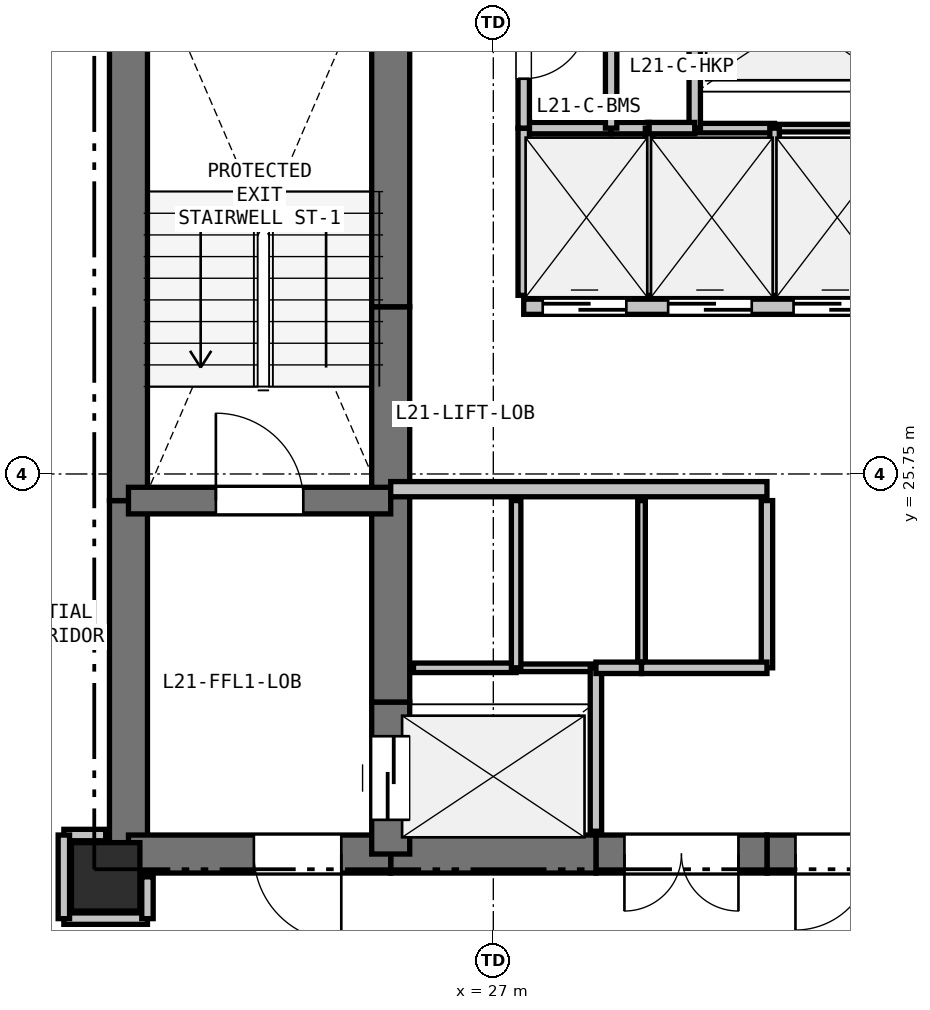
"""IFC4 building model, lengths in metres.
Left out: names, types, materials, properties, quantities, classifications, styles, units other than length and angle.
Written with IfcOpenShell. Run it as: python <this file> out.ifc"""

import sys

from ifc_helpers import new_model, si_unit, direction, frame, frame_2d, origin, origin_2d, place, context, subcontext, project, spatial, rectangle, extrude, element, fill, save


model = new_model("IFC4")
c1 = context("Model", 3, precision=1e-05, world=origin(), true_north=direction((0.0, 1.0)))
c2 = subcontext(c1, "Body", "Model", "MODEL_VIEW")
j1 = project(units=[si_unit("LENGTHUNIT", "METRE"), si_unit("PLANEANGLEUNIT", "RADIAN")], contexts=[c1])
p1 = place(None, origin())
s1 = spatial("IfcSite", under=j1, at=p1, CompositionType="ELEMENT")
p2 = place(p1, origin())
s2 = spatial("IfcBuilding", under=s1, at=p2, CompositionType="ELEMENT")
p3 = place(p2, frame((0.0, 0.0, 80.1)))
s3 = spatial("IfcBuildingStorey", under=s2, at=p3, CompositionType="ELEMENT", Elevation=80.1)
p4 = place(p3, frame((21.9, 20.45, 0.0), z_axis=(0.0, 0.0, 1.0), x_axis=(1.0, 0.0, 0.0)))
e1 = element("IfcColumn", 1, at=p4, inside=s3, PredefinedType="COLUMN", context=c2, shape_type="SweptSolid", body=[
    extrude(rectangle(XDim=0.9, YDim=0.9, at=origin_2d()), origin(), (0.0, 0.0, 1.0), 3.3),
])
p5 = place(p3, frame((22.2, 20.75, 0.0), z_axis=(0.0, 0.0, 1.0), x_axis=(0.0, 1.0, 0.0)))
e2 = element("IfcWall", 2, at=p5, inside=s3, PredefinedType="SHEAR", context=c2, shape_type="SweptSolid", body=[
    extrude(rectangle(XDim=4.65, YDim=0.5, at=frame_2d((2.325, 0.0))), origin(), (0.0, 0.0, 1.0), 3.05),
])
p6 = place(p3, frame((22.2, 25.4, 0.0), z_axis=(0.0, 0.0, 1.0), x_axis=(0.0, 1.0, 0.0)))
e3 = element("IfcWall", 3, at=p6, inside=s3, PredefinedType="SHEAR", context=c2, shape_type="SweptSolid", body=[
    extrude(rectangle(XDim=7.35, YDim=0.5, at=frame_2d((3.675, 0.0))), origin(), (0.0, 0.0, 1.0), 3.05),
])
p7 = place(p3, frame((32.35, 20.75, 0.0), z_axis=(0.0, 0.0, 1.0), x_axis=(-1.0, 0.0, 0.0)))
e4 = element("IfcWall", 4, at=p7, inside=s3, PredefinedType="SHEAR", context=c2, shape_type="SweptSolid", body=[
    extrude(rectangle(XDim=1.75, YDim=0.5, at=frame_2d((0.875, 0.0))), origin(), (0.0, 0.0, 1.0), 3.05),
])
p8 = place(p7, frame((0.375, 0.0, 0.0)))
e5 = element("IfcOpeningElement", 5, at=p8, cuts=e4, PredefinedType="OPENING", context=c2, shape_type="SweptSolid", body=[
    extrude(rectangle(XDim=1.0, YDim=2.15, at=frame_2d((0.5, 1.075))), frame((0.0, 0.26, 0.0), z_axis=(0.0, -1.0, 0.0), x_axis=(1.0, 0.0, 0.0)), (0.0, 0.0, 1.0), 0.52),
])
p9 = place(p3, frame((30.6, 20.75, 0.0), z_axis=(0.0, 0.0, 1.0), x_axis=(-1.0, 0.0, 0.0)))
e6 = element("IfcWall", 6, at=p9, inside=s3, PredefinedType="SHEAR", context=c2, shape_type="SweptSolid", body=[
    extrude(rectangle(XDim=2.25, YDim=0.5, at=frame_2d((1.125, 0.0))), origin(), (0.0, 0.0, 1.0), 3.05),
])
p10 = place(p9, frame((0.375, 0.0, 0.0)))
e7 = element("IfcOpeningElement", 7, at=p10, cuts=e6, PredefinedType="OPENING", context=c2, shape_type="SweptSolid", body=[
    extrude(rectangle(XDim=1.5, YDim=2.2, at=frame_2d((0.75, 1.1))), frame((0.0, 0.26, 0.0), z_axis=(0.0, -1.0, 0.0), x_axis=(1.0, 0.0, 0.0)), (0.0, 0.0, 1.0), 0.52),
])
p11 = place(p3, frame((28.35, 20.75, 0.0), z_axis=(0.0, 0.0, 1.0), x_axis=(-1.0, 0.0, 0.0)))
e8 = element("IfcWall", 8, at=p11, inside=s3, PredefinedType="SHEAR", context=c2, shape_type="SweptSolid", body=[
    extrude(rectangle(XDim=2.7, YDim=0.5, at=frame_2d((1.35, 0.0))), origin(), (0.0, 0.0, 1.0), 3.05),
])
p12 = place(p3, frame((25.65, 20.75, 0.0), z_axis=(0.0, 0.0, 1.0), x_axis=(-1.0, 0.0, 0.0)))
e9 = element("IfcWall", 9, at=p12, inside=s3, PredefinedType="SHEAR", context=c2, shape_type="SweptSolid", body=[
    extrude(rectangle(XDim=3.45, YDim=0.5, at=frame_2d((1.725, 0.0))), origin(), (0.0, 0.0, 1.0), 3.05),
])
p13 = place(p12, frame((0.65, 0.0, 0.0)))
e10 = element("IfcOpeningElement", 10, at=p13, cuts=e9, PredefinedType="OPENING", context=c2, shape_type="SweptSolid", body=[
    extrude(rectangle(XDim=1.15, YDim=2.15, at=frame_2d((0.575, 1.075))), frame((0.0, 0.26, 0.0), z_axis=(0.0, -1.0, 0.0), x_axis=(1.0, 0.0, 0.0)), (0.0, 0.0, 1.0), 0.52),
])
p14 = place(p3, frame((25.65, 20.75, 0.0), z_axis=(0.0, 0.0, 1.0), x_axis=(0.0, 1.0, 0.0)))
e11 = element("IfcWall", 11, at=p14, inside=s3, PredefinedType="SHEAR", context=c2, shape_type="SweptSolid", body=[
    extrude(rectangle(XDim=2.0, YDim=0.5, at=frame_2d((1.0, 0.0))), origin(), (0.0, 0.0, 1.0), 3.05),
])
p15 = place(p14, frame((0.45, 0.0, 0.0)))
e12 = element("IfcOpeningElement", 12, at=p15, cuts=e11, PredefinedType="OPENING", context=c2, shape_type="SweptSolid", body=[
    extrude(rectangle(XDim=1.1, YDim=2.15, at=frame_2d((0.55, 1.075))), frame((0.0, 0.26, 0.0), z_axis=(0.0, -1.0, 0.0), x_axis=(1.0, 0.0, 0.0)), (0.0, 0.0, 1.0), 0.52),
])
p16 = place(p3, frame((25.65, 22.75, 0.0), z_axis=(0.0, 0.0, 1.0), x_axis=(0.0, 1.0, 0.0)))
e13 = element("IfcWall", 13, at=p16, inside=s3, PredefinedType="SHEAR", context=c2, shape_type="SweptSolid", body=[
    extrude(rectangle(XDim=2.8, YDim=0.5, at=frame_2d((1.4, 0.0))), origin(), (0.0, 0.0, 1.0), 3.05),
])
p17 = place(p3, frame((25.65, 25.55, 0.0), z_axis=(0.0, 0.0, 1.0), x_axis=(0.0, 1.0, 0.0)))
e14 = element("IfcWall", 14, at=p17, inside=s3, PredefinedType="SHEAR", context=c2, shape_type="SweptSolid", body=[
    extrude(rectangle(XDim=2.4, YDim=0.5, at=frame_2d((1.2, 0.0))), origin(), (0.0, 0.0, 1.0), 3.05),
])
p18 = place(p3, frame((25.65, 27.95, 0.0), z_axis=(0.0, 0.0, 1.0), x_axis=(0.0, 1.0, 0.0)))
e15 = element("IfcWall", 15, at=p18, inside=s3, PredefinedType="SHEAR", context=c2, shape_type="SweptSolid", body=[
    extrude(rectangle(XDim=4.8, YDim=0.5, at=frame_2d((2.4, 0.0))), origin(), (0.0, 0.0, 1.0), 3.05),
])
p19 = place(p3, frame((22.2, 25.4, 0.0), z_axis=(0.0, 0.0, 1.0), x_axis=(1.0, 0.0, 0.0)))
e16 = element("IfcWall", 16, at=p19, inside=s3, PredefinedType="SHEAR", context=c2, shape_type="SweptSolid", body=[
    extrude(rectangle(XDim=3.45, YDim=0.35, at=frame_2d((1.725, 0.0))), origin(), (0.0, 0.0, 1.0), 3.05),
])
p20 = place(p19, frame((1.15, 0.0, 0.0)))
e17 = element("IfcOpeningElement", 17, at=p20, cuts=e16, PredefinedType="OPENING", context=c2, shape_type="SweptSolid", body=[
    extrude(rectangle(XDim=1.15, YDim=2.15, at=frame_2d((0.575, 1.075))), frame((0.0, 0.185, 0.0), z_axis=(0.0, -1.0, 0.0), x_axis=(1.0, 0.0, 0.0)), (0.0, 0.0, 1.0), 0.37),
])
p21 = place(p3, frame((25.65, 25.55, 0.0), z_axis=(0.0, 0.0, 1.0), x_axis=(1.0, 0.0, 0.0)))
e18 = element("IfcWall", 18, at=p21, inside=s3, PredefinedType="PARTITIONING", context=c2, shape_type="SweptSolid", body=[
    extrude(rectangle(XDim=4.95, YDim=0.2, at=frame_2d((2.475, 0.0))), origin(), (0.0, 0.0, 1.0), 3.05),
])
p22 = place(p3, frame((27.4, 27.95, 0.0), z_axis=(0.0, 0.0, 1.0), x_axis=(1.0, 0.0, 0.0)))
e19 = element("IfcWall", 19, at=p22, inside=s3, PredefinedType="PARTITIONING", context=c2, shape_type="SweptSolid", body=[
    extrude(rectangle(XDim=4.95, YDim=0.2, at=frame_2d((2.475, 0.0))), origin(), (0.0, 0.0, 1.0), 3.05),
])
p23 = place(p22, frame((0.25, 0.0, 0.0)))
e20 = element("IfcOpeningElement", 20, at=p23, cuts=e19, PredefinedType="OPENING", context=c2, shape_type="SweptSolid", body=[
    extrude(rectangle(XDim=1.1, YDim=2.15, at=frame_2d((0.55, 1.075))), frame((0.0, 0.11, 0.0), z_axis=(0.0, -1.0, 0.0), x_axis=(1.0, 0.0, 0.0)), (0.0, 0.0, 1.0), 0.22),
])
p24 = place(p22, frame((1.9, 0.0, 0.0)))
e21 = element("IfcOpeningElement", 21, at=p24, cuts=e19, PredefinedType="OPENING", context=c2, shape_type="SweptSolid", body=[
    extrude(rectangle(XDim=1.1, YDim=2.15, at=frame_2d((0.55, 1.075))), frame((0.0, 0.11, 0.0), z_axis=(0.0, -1.0, 0.0), x_axis=(1.0, 0.0, 0.0)), (0.0, 0.0, 1.0), 0.22),
])
p25 = place(p22, frame((3.55, 0.0, 0.0)))
e22 = element("IfcOpeningElement", 22, at=p25, cuts=e19, PredefinedType="OPENING", context=c2, shape_type="SweptSolid", body=[
    extrude(rectangle(XDim=1.1, YDim=2.15, at=frame_2d((0.55, 1.075))), frame((0.0, 0.11, 0.0), z_axis=(0.0, -1.0, 0.0), x_axis=(1.0, 0.0, 0.0)), (0.0, 0.0, 1.0), 0.22),
])
p26 = place(p3, frame((25.95, 23.2, 0.0), z_axis=(0.0, 0.0, 1.0), x_axis=(1.0, 0.0, 0.0)))
e23 = element("IfcWall", 23, at=p26, inside=s3, PredefinedType="PARTITIONING", context=c2, shape_type="SweptSolid", body=[
    extrude(rectangle(XDim=1.35, YDim=0.125, at=frame_2d((0.675, 0.0))), origin(), (0.0, 0.0, 1.0), 3.05),
])
p27 = place(p3, frame((27.3, 23.2, 0.0), z_axis=(0.0, 0.0, 1.0), x_axis=(1.0, 0.0, 0.0)))
e24 = element("IfcWall", 24, at=p27, inside=s3, PredefinedType="PARTITIONING", context=c2, shape_type="SweptSolid", body=[
    extrude(rectangle(XDim=1.05, YDim=0.1, at=frame_2d((0.525, 0.0))), origin(), (0.0, 0.0, 1.0), 3.05),
])
p28 = place(p3, frame((28.35, 23.2, 0.0), z_axis=(0.0, 0.0, 1.0), x_axis=(0.0, -1.0, 0.0)))
e25 = element("IfcWall", 25, at=p28, inside=s3, PredefinedType="PARTITIONING", context=c2, shape_type="SweptSolid", body=[
    extrude(rectangle(XDim=2.15, YDim=0.15, at=frame_2d((1.075, 0.0))), origin(), (0.0, 0.0, 1.0), 3.05),
])
p29 = place(p3, frame((32.05, 30.3, 0.0), z_axis=(0.0, 0.0, 1.0), x_axis=(-1.0, 0.0, 0.0)))
e26 = element("IfcWall", 26, at=p29, inside=s3, PredefinedType="PARTITIONING", context=c2, shape_type="SweptSolid", body=[
    extrude(rectangle(XDim=1.35, YDim=0.1, at=frame_2d((0.675, 0.0))), origin(), (0.0, 0.0, 1.0), 3.05),
])
p30 = place(p3, frame((30.7, 30.3, 0.0), z_axis=(0.0, 0.0, 1.0), x_axis=(-1.0, 0.0, 0.0)))
e27 = element("IfcWall", 27, at=p30, inside=s3, PredefinedType="PARTITIONING", context=c2, shape_type="SweptSolid", body=[
    extrude(rectangle(XDim=1.05, YDim=0.125, at=frame_2d((0.525, 0.0))), origin(), (0.0, 0.0, 1.0), 3.05),
])
p31 = place(p3, frame((29.65, 30.3, 0.0), z_axis=(0.0, 0.0, 1.0), x_axis=(0.0, 1.0, 0.0)))
e28 = element("IfcWall", 28, at=p31, inside=s3, PredefinedType="PARTITIONING", context=c2, shape_type="SweptSolid", body=[
    extrude(rectangle(XDim=2.15, YDim=0.15, at=frame_2d((1.075, 0.0))), origin(), (0.0, 0.0, 1.0), 3.05),
])
p32 = place(p3, frame((27.3, 25.4, 0.0), z_axis=(0.0, 0.0, 1.0), x_axis=(0.0, -1.0, 0.0)))
e29 = element("IfcWall", 29, at=p32, inside=s3, PredefinedType="PARTITIONING", context=c2, shape_type="SweptSolid", body=[
    extrude(rectangle(XDim=2.2, YDim=0.125, at=frame_2d((1.1, 0.0))), origin(), (0.0, 0.0, 1.0), 3.05),
])
p33 = place(p3, frame((28.95, 25.4, 0.0), z_axis=(0.0, 0.0, 1.0), x_axis=(0.0, -1.0, 0.0)))
e30 = element("IfcWall", 30, at=p33, inside=s3, PredefinedType="PARTITIONING", context=c2, shape_type="SweptSolid", body=[
    extrude(rectangle(XDim=2.2, YDim=0.1, at=frame_2d((1.1, 0.0))), origin(), (0.0, 0.0, 1.0), 3.05),
])
p34 = place(p3, frame((28.95, 23.2, 0.0), z_axis=(0.0, 0.0, 1.0), x_axis=(-1.0, 0.0, 0.0)))
e31 = element("IfcWall", 31, at=p34, inside=s3, PredefinedType="PARTITIONING", context=c2, shape_type="SweptSolid", body=[
    extrude(rectangle(XDim=0.6, YDim=0.15, at=frame_2d((0.3, 0.0))), origin(), (0.0, 0.0, 1.0), 3.05),
])
p35 = place(p3, frame((30.6, 25.4, 0.0), z_axis=(0.0, 0.0, 1.0), x_axis=(0.0, -1.0, 0.0)))
e32 = element("IfcWall", 32, at=p35, inside=s3, PredefinedType="PARTITIONING", context=c2, shape_type="SweptSolid", body=[
    extrude(rectangle(XDim=2.2, YDim=0.15, at=frame_2d((1.1, 0.0))), origin(), (0.0, 0.0, 1.0), 3.05),
])
p36 = place(p3, frame((30.6, 23.2, 0.0), z_axis=(0.0, 0.0, 1.0), x_axis=(-1.0, 0.0, 0.0)))
e33 = element("IfcWall", 33, at=p36, inside=s3, PredefinedType="PARTITIONING", context=c2, shape_type="SweptSolid", body=[
    extrude(rectangle(XDim=1.65, YDim=0.15, at=frame_2d((0.825, 0.0))), origin(), (0.0, 0.0, 1.0), 3.05),
])
p37 = place(p3, frame((27.4, 30.3, 0.0), z_axis=(0.0, 0.0, 1.0), x_axis=(1.0, 0.0, 0.0)))
e34 = element("IfcWall", 34, at=p37, inside=s3, PredefinedType="PARTITIONING", context=c2, shape_type="SweptSolid", body=[
    extrude(rectangle(XDim=1.15, YDim=0.15, at=frame_2d((0.575, 0.0))), origin(), (0.0, 0.0, 1.0), 3.05),
])
p38 = place(p3, frame((28.55, 30.3, 0.0), z_axis=(0.0, 0.0, 1.0), x_axis=(1.0, 0.0, 0.0)))
e35 = element("IfcWall", 35, at=p38, inside=s3, PredefinedType="PARTITIONING", context=c2, shape_type="SweptSolid", body=[
    extrude(rectangle(XDim=0.5, YDim=0.15, at=frame_2d((0.25, 0.0))), origin(), (0.0, 0.0, 1.0), 3.05),
])
p39 = place(p3, frame((29.05, 30.3, 0.0), z_axis=(0.0, 0.0, 1.0), x_axis=(0.0, -1.0, 0.0)))
e36 = element("IfcWall", 36, at=p39, inside=s3, PredefinedType="PARTITIONING", context=c2, shape_type="SweptSolid", body=[
    extrude(rectangle(XDim=2.2, YDim=0.1, at=frame_2d((1.1, 0.0))), origin(), (0.0, 0.0, 1.0), 3.05),
])
p40 = place(p3, frame((27.4, 28.1, 0.0), z_axis=(0.0, 0.0, 1.0), x_axis=(0.0, 1.0, 0.0)))
e37 = element("IfcWall", 37, at=p40, inside=s3, PredefinedType="PARTITIONING", context=c2, shape_type="SweptSolid", body=[
    extrude(rectangle(XDim=2.2, YDim=0.15, at=frame_2d((1.1, 0.0))), origin(), (0.0, 0.0, 1.0), 3.05),
])
p41 = place(p3, frame((29.05, 30.3, 0.0), z_axis=(0.0, 0.0, 1.0), x_axis=(1.0, 0.0, 0.0)))
e38 = element("IfcWall", 38, at=p41, inside=s3, PredefinedType="PARTITIONING", context=c2, shape_type="SweptSolid", body=[
    extrude(rectangle(XDim=0.6, YDim=0.15, at=frame_2d((0.3, 0.0))), origin(), (0.0, 0.0, 1.0), 3.05),
])
p42 = place(p3, frame((30.7, 30.3, 0.0), z_axis=(0.0, 0.0, 1.0), x_axis=(0.0, -1.0, 0.0)))
e39 = element("IfcWall", 39, at=p42, inside=s3, PredefinedType="PARTITIONING", context=c2, shape_type="SweptSolid", body=[
    extrude(rectangle(XDim=2.2, YDim=0.125, at=frame_2d((1.1, 0.0))), origin(), (0.0, 0.0, 1.0), 3.05),
])
p43 = place(p3, frame((27.4, 32.45, 0.0), z_axis=(0.0, 0.0, 1.0), x_axis=(0.0, -1.0, 0.0)))
e40 = element("IfcWall", 40, at=p43, inside=s3, PredefinedType="PARTITIONING", context=c2, shape_type="SweptSolid", body=[
    extrude(rectangle(XDim=2.15, YDim=0.15, at=frame_2d((1.075, 0.0))), origin(), (0.0, 0.0, 1.0), 3.05),
])
p44 = place(p43, frame((0.65, 0.0, 0.0)))
e41 = element("IfcOpeningElement", 41, at=p44, cuts=e40, PredefinedType="OPENING", context=c2, shape_type="SweptSolid", body=[
    extrude(rectangle(XDim=0.85, YDim=2.1, at=frame_2d((0.425, 1.05))), frame((0.0, 0.085, 0.0), z_axis=(0.0, -1.0, 0.0), x_axis=(1.0, 0.0, 0.0)), (0.0, 0.0, 1.0), 0.17),
])
p45 = place(p3, frame((21.35, 19.9, 0.0), z_axis=(0.0, 0.0, 1.0), x_axis=(1.0, 0.0, 0.0)))
e42 = element("IfcWall", 42, at=p45, inside=s3, PredefinedType="PARTITIONING", context=c2, shape_type="SweptSolid", body=[
    extrude(rectangle(XDim=1.1, YDim=0.15, at=frame_2d((0.55, 0.0))), origin(), (0.0, 0.0, 1.0), 2.423),
])
p46 = place(p3, frame((22.45, 19.9, 0.0), z_axis=(0.0, 0.0, 1.0), x_axis=(0.0, 1.0, 0.0)))
e43 = element("IfcWall", 43, at=p46, inside=s3, PredefinedType="PARTITIONING", context=c2, shape_type="SweptSolid", body=[
    extrude(rectangle(XDim=0.55, YDim=0.15, at=frame_2d((0.275, 0.0))), origin(), (0.0, 0.0, 1.0), 2.423),
])
p47 = place(p3, frame((21.9, 21.0, 0.0), z_axis=(0.0, 0.0, 1.0), x_axis=(-1.0, 0.0, 0.0)))
e44 = element("IfcWall", 44, at=p47, inside=s3, PredefinedType="PARTITIONING", context=c2, shape_type="SweptSolid", body=[
    extrude(rectangle(XDim=0.55, YDim=0.15, at=frame_2d((0.275, 0.0))), origin(), (0.0, 0.0, 1.0), 2.498),
])
p48 = place(p3, frame((21.35, 21.0, 0.0), z_axis=(0.0, 0.0, 1.0), x_axis=(0.0, -1.0, 0.0)))
e45 = element("IfcWall", 45, at=p48, inside=s3, PredefinedType="PARTITIONING", context=c2, shape_type="SweptSolid", body=[
    extrude(rectangle(XDim=1.1, YDim=0.15, at=frame_2d((0.55, 0.0))), origin(), (0.0, 0.0, 1.0), 2.423),
])
p49 = place(p3, frame((28.55, 32.45, 0.0), z_axis=(0.0, 0.0, 1.0), x_axis=(0.0, -1.0, 0.0)))
e46 = element("IfcWall", 46, at=p49, inside=s3, PredefinedType="PARTITIONING", context=c2, shape_type="SweptSolid", body=[
    extrude(rectangle(XDim=2.15, YDim=0.15, at=frame_2d((1.075, 0.0))), origin(), (0.0, 0.0, 1.0), 3.05),
])
p50 = place(p23, origin())
e47 = element("IfcDoor", 47, at=p50, inside=s3, OperationType="SLIDING_TO_LEFT", PredefinedType="DOOR", context=c2, shape_type="SweptSolid", body=[
    extrude(rectangle(XDim=1.1, YDim=2.15, at=frame_2d((0.55, 1.075))), frame((0.0, 0.025, 0.0), z_axis=(0.0, -1.0, 0.0), x_axis=(1.0, 0.0, 0.0)), (0.0, 0.0, 1.0), 0.05),
])
fill(e20, e47)
p51 = place(p24, origin())
e48 = element("IfcDoor", 48, at=p51, inside=s3, OperationType="SLIDING_TO_LEFT", PredefinedType="DOOR", context=c2, shape_type="SweptSolid", body=[
    extrude(rectangle(XDim=1.1, YDim=2.15, at=frame_2d((0.55, 1.075))), frame((0.0, 0.025, 0.0), z_axis=(0.0, -1.0, 0.0), x_axis=(1.0, 0.0, 0.0)), (0.0, 0.0, 1.0), 0.05),
])
fill(e21, e48)
p52 = place(p25, origin())
e49 = element("IfcDoor", 49, at=p52, inside=s3, OperationType="SLIDING_TO_LEFT", PredefinedType="DOOR", context=c2, shape_type="SweptSolid", body=[
    extrude(rectangle(XDim=1.1, YDim=2.15, at=frame_2d((0.55, 1.075))), frame((0.0, 0.025, 0.0), z_axis=(0.0, -1.0, 0.0), x_axis=(1.0, 0.0, 0.0)), (0.0, 0.0, 1.0), 0.05),
])
fill(e22, e49)
p53 = place(p8, origin())
e50 = element("IfcDoor", 50, at=p53, inside=s3, OperationType="SINGLE_SWING_RIGHT", PredefinedType="DOOR", context=c2, shape_type="SweptSolid", body=[
    extrude(rectangle(XDim=1.0, YDim=2.15, at=frame_2d((0.5, 1.075))), frame((0.0, 0.025, 0.0), z_axis=(0.0, -1.0, 0.0), x_axis=(1.0, 0.0, 0.0)), (0.0, 0.0, 1.0), 0.05),
])
fill(e5, e50)
p54 = place(p15, origin())
e51 = element("IfcDoor", 51, at=p54, inside=s3, OperationType="SLIDING_TO_LEFT", PredefinedType="DOOR", context=c2, shape_type="SweptSolid", body=[
    extrude(rectangle(XDim=1.1, YDim=2.15, at=frame_2d((0.55, 1.075))), frame((0.0, 0.025, 0.0), z_axis=(0.0, -1.0, 0.0), x_axis=(1.0, 0.0, 0.0)), (0.0, 0.0, 1.0), 0.05),
])
fill(e12, e51)
p55 = place(p20, origin())
e52 = element("IfcDoor", 52, at=p55, inside=s3, OperationType="SINGLE_SWING_LEFT", PredefinedType="DOOR", context=c2, shape_type="SweptSolid", body=[
    extrude(rectangle(XDim=1.15, YDim=2.15, at=frame_2d((0.575, 1.075))), frame((0.0, 0.025, 0.0), z_axis=(0.0, -1.0, 0.0), x_axis=(1.0, 0.0, 0.0)), (0.0, 0.0, 1.0), 0.05),
])
fill(e17, e52)
p56 = place(p13, origin())
e53 = element("IfcDoor", 53, at=p56, inside=s3, OperationType="SINGLE_SWING_LEFT", PredefinedType="DOOR", context=c2, shape_type="SweptSolid", body=[
    extrude(rectangle(XDim=1.15, YDim=2.15, at=frame_2d((0.575, 1.075))), frame((0.0, 0.025, 0.0), z_axis=(0.0, -1.0, 0.0), x_axis=(1.0, 0.0, 0.0)), (0.0, 0.0, 1.0), 0.05),
])
fill(e10, e53)
p57 = place(p10, origin())
e54 = element("IfcDoor", 54, at=p57, inside=s3, OperationType="DOUBLE_DOOR_SINGLE_SWING", PredefinedType="DOOR", context=c2, shape_type="SweptSolid", body=[
    extrude(rectangle(XDim=1.5, YDim=2.2, at=frame_2d((0.75, 1.1))), frame((0.0, 0.025, 0.0), z_axis=(0.0, -1.0, 0.0), x_axis=(1.0, 0.0, 0.0)), (0.0, 0.0, 1.0), 0.05),
])
fill(e7, e54)
p58 = place(p44, origin())
e55 = element("IfcDoor", 55, at=p58, inside=s3, OperationType="SINGLE_SWING_LEFT", PredefinedType="DOOR", context=c2, shape_type="SweptSolid", body=[
    extrude(rectangle(XDim=0.85, YDim=2.1, at=frame_2d((0.425, 1.05))), frame((0.0, 0.025, 0.0), z_axis=(0.0, -1.0, 0.0), x_axis=(1.0, 0.0, 0.0)), (0.0, 0.0, 1.0), 0.05),
])
fill(e41, e55)
save(model, sys.argv[1])
